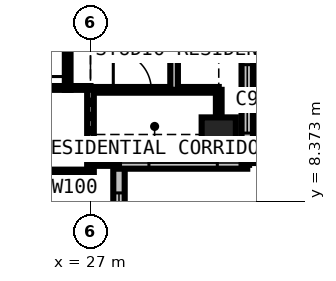
"""IFC4 building model, lengths in metres.
Left out: names, types, materials, properties, quantities, classifications, styles, units other than length and angle.
Written with IfcOpenShell. Run it as: python <this file> out.ifc"""

import sys

from ifc_helpers import new_model, si_unit, direction, frame, frame_2d, origin, origin_2d, place, context, subcontext, project, spatial, rectangle, extrude, element, fill, save


model = new_model("IFC4")
c1 = context("Model", 3, precision=1e-05, world=origin(), true_north=direction((0.0, 1.0)))
c2 = subcontext(c1, "Body", "Model", "MODEL_VIEW")
j1 = project(units=[si_unit("LENGTHUNIT", "METRE"), si_unit("PLANEANGLEUNIT", "RADIAN")], contexts=[c1])
p1 = place(None, origin())
s1 = spatial("IfcSite", under=j1, at=p1, CompositionType="ELEMENT")
p2 = place(p1, origin())
s2 = spatial("IfcBuilding", under=s1, at=p2, CompositionType="ELEMENT")
p3 = place(p2, frame((0.0, 0.0, 211.5)))
s3 = spatial("IfcBuildingStorey", under=s2, at=p3, CompositionType="ELEMENT", Elevation=211.5)
p4 = place(p3, frame((30.375, 10.125, 0.0), z_axis=(0.0, 0.0, 1.0), x_axis=(1.0, 0.0, 0.0)))
e1 = element("IfcColumn", 1, at=p4, inside=s3, PredefinedType="COLUMN", context=c2, shape_type="SweptSolid", body=[
    extrude(rectangle(XDim=0.9, YDim=0.9, at=origin_2d()), origin(), (0.0, 0.0, 1.0), 3.6),
])
p5 = place(p3, frame((27.75, 6.0, 0.0), z_axis=(0.0, 0.0, 1.0), x_axis=(0.0, 1.0, 0.0)))
e2 = element("IfcWall", 2, at=p5, inside=s3, PredefinedType="SOLIDWALL", context=c2, shape_type="SweptSolid", body=[
    extrude(rectangle(XDim=3.375, YDim=0.3, at=frame_2d((1.688, 0.0))), origin(), (0.0, 0.0, 1.0), 3.375),
])
p6 = place(p5, frame((0.788, 0.0, 0.6)))
e3 = element("IfcOpeningElement", 3, at=p6, cuts=e2, PredefinedType="OPENING", context=c2, shape_type="SweptSolid", body=[
    extrude(rectangle(XDim=1.8, YDim=2.1, at=frame_2d((0.9, 1.05))), frame((0.0, 0.16, 0.0), z_axis=(0.0, -1.0, 0.0), x_axis=(1.0, 0.0, 0.0)), (0.0, 0.0, 1.0), 0.32),
])
p7 = place(p3, frame((27.75, 9.375, 0.0), z_axis=(0.0, 0.0, 1.0), x_axis=(1.0, 0.0, 0.0)))
e4 = element("IfcWall", 4, at=p7, inside=s3, PredefinedType="SOLIDWALL", context=c2, shape_type="SweptSolid", body=[
    extrude(rectangle(XDim=3.375, YDim=0.3, at=frame_2d((1.688, 0.0))), origin(), (0.0, 0.0, 1.0), 3.375),
])
p8 = place(p7, frame((0.788, 0.0, 0.6)))
e5 = element("IfcOpeningElement", 5, at=p8, cuts=e4, PredefinedType="OPENING", context=c2, shape_type="SweptSolid", body=[
    extrude(rectangle(XDim=1.8, YDim=2.1, at=frame_2d((0.9, 1.05))), frame((0.0, 0.16, 0.0), z_axis=(0.0, -1.0, 0.0), x_axis=(1.0, 0.0, 0.0)), (0.0, 0.0, 1.0), 0.32),
])
p9 = place(p3, frame((31.125, 9.375, 0.0), z_axis=(0.0, 0.0, 1.0), x_axis=(0.0, 1.0, 0.0)))
e6 = element("IfcWall", 6, at=p9, inside=s3, PredefinedType="SOLIDWALL", context=c2, shape_type="SweptSolid", body=[
    extrude(rectangle(XDim=3.375, YDim=0.3, at=frame_2d((1.688, 0.0))), origin(), (0.0, 0.0, 1.0), 3.375),
])
p10 = place(p9, frame((0.788, 0.0, 0.6)))
e7 = element("IfcOpeningElement", 7, at=p10, cuts=e6, PredefinedType="OPENING", context=c2, shape_type="SweptSolid", body=[
    extrude(rectangle(XDim=1.8, YDim=2.1, at=frame_2d((0.9, 1.05))), frame((0.0, 0.16, 0.0), z_axis=(0.0, -1.0, 0.0), x_axis=(1.0, 0.0, 0.0)), (0.0, 0.0, 1.0), 0.32),
])
p11 = place(p3, frame((23.625, 11.35, 0.0), z_axis=(0.0, 0.0, 1.0), x_axis=(1.0, 0.0, 0.0)))
e8 = element("IfcWall", 8, at=p11, inside=s3, PredefinedType="PARTITIONING", context=c2, shape_type="SweptSolid", body=[
    extrude(rectangle(XDim=3.375, YDim=0.1, at=frame_2d((1.688, 0.0))), origin(), (0.0, 0.0, 1.0), 3.375),
])
p12 = place(p11, frame((0.25, 0.0, 0.0)))
e9 = element("IfcOpeningElement", 9, at=p12, cuts=e8, PredefinedType="OPENING", context=c2, shape_type="SweptSolid", body=[
    extrude(rectangle(XDim=0.95, YDim=2.2, at=frame_2d((0.475, 1.1))), frame((0.0, 0.06, 0.0), z_axis=(0.0, -1.0, 0.0), x_axis=(1.0, 0.0, 0.0)), (0.0, 0.0, 1.0), 0.12),
])
p13 = place(p3, frame((25.0, 9.15, 0.0), z_axis=(0.0, 0.0, 1.0), x_axis=(1.0, 0.0, 0.0)))
e10 = element("IfcWall", 10, at=p13, inside=s3, PredefinedType="PARTITIONING", context=c2, shape_type="SweptSolid", body=[
    extrude(rectangle(XDim=2.0, YDim=0.1, at=frame_2d((1.0, 0.0))), origin(), (0.0, 0.0, 1.0), 3.375),
])
p14 = place(p3, frame((26.4, 11.3, 0.0), z_axis=(0.0, 0.0, 1.0), x_axis=(0.0, 1.0, 0.0)))
e11 = element("IfcWall", 11, at=p14, inside=s3, PredefinedType="PARTITIONING", context=c2, shape_type="SweptSolid", body=[
    extrude(rectangle(XDim=1.6, YDim=0.15, at=frame_2d((0.8, 0.0))), origin(), (0.0, 0.0, 1.0), 3.375),
])
p15 = place(p14, frame((0.35, 0.0, 0.0)))
e12 = element("IfcOpeningElement", 12, at=p15, cuts=e11, PredefinedType="OPENING", context=c2, shape_type="SweptSolid", body=[
    extrude(rectangle(XDim=1.0, YDim=2.2, at=frame_2d((0.5, 1.1))), frame((0.0, 0.085, 0.0), z_axis=(0.0, -1.0, 0.0), x_axis=(1.0, 0.0, 0.0)), (0.0, 0.0, 1.0), 0.17),
])
p16 = place(p3, frame((27.0, 11.3, 0.0), z_axis=(0.0, 0.0, 1.0), x_axis=(1.0, 0.0, 0.0)))
e13 = element("IfcWall", 13, at=p16, inside=s3, PredefinedType="PARTITIONING", context=c2, shape_type="SweptSolid", body=[
    extrude(rectangle(XDim=3.375, YDim=0.15, at=frame_2d((1.688, 0.0))), origin(), (0.0, 0.0, 1.0), 3.375),
])
p17 = place(p16, frame((0.6, 0.0, 0.0)))
e14 = element("IfcOpeningElement", 14, at=p17, cuts=e13, PredefinedType="OPENING", context=c2, shape_type="SweptSolid", body=[
    extrude(rectangle(XDim=1.0, YDim=2.2, at=frame_2d((0.5, 1.1))), frame((0.0, 0.085, 0.0), z_axis=(0.0, -1.0, 0.0), x_axis=(1.0, 0.0, 0.0)), (0.0, 0.0, 1.0), 0.17),
])
p18 = place(p3, frame((27.0, 6.016, 0.0), z_axis=(0.0, 0.0, 1.0), x_axis=(0.0, 1.0, 0.0)))
e15 = element("IfcWall", 15, at=p18, inside=s3, PredefinedType="PARTITIONING", context=c2, shape_type="SweptSolid", body=[
    extrude(rectangle(XDim=5.334, YDim=0.175, at=frame_2d((2.667, 0.0))), origin(), (0.0, 0.0, 1.0), 2.877),
])
p19 = place(p3, frame((27.0, 9.375, 0.0), z_axis=(0.0, 0.0, 1.0), x_axis=(1.0, 0.0, 0.0)))
e16 = element("IfcWall", 16, at=p19, inside=s3, PredefinedType="PARTITIONING", context=c2, shape_type="SweptSolid", body=[
    extrude(rectangle(XDim=0.734, YDim=0.15, at=frame_2d((0.367, 0.0))), origin(), (0.0, 0.0, 1.0), 3.375),
])
p20 = place(p3, frame((29.2, 11.3, 0.0), z_axis=(0.0, 0.0, 1.0), x_axis=(0.0, 1.0, 0.0)))
e17 = element("IfcWall", 17, at=p20, inside=s3, PredefinedType="PARTITIONING", context=c2, shape_type="SweptSolid", body=[
    extrude(rectangle(XDim=17.9, YDim=0.2, at=frame_2d((8.95, 0.0))), origin(), (0.0, 0.0, 1.0), 3.375),
])
p21 = place(p20, frame((2.3, 0.0, 0.0)))
e18 = element("IfcOpeningElement", 18, at=p21, cuts=e17, PredefinedType="OPENING", context=c2, shape_type="SweptSolid", body=[
    extrude(rectangle(XDim=1.0, YDim=2.2, at=frame_2d((0.5, 1.1))), frame((0.0, 0.11, 0.0), z_axis=(0.0, -1.0, 0.0), x_axis=(1.0, 0.0, 0.0)), (0.0, 0.0, 1.0), 0.22),
])
p22 = place(p20, frame((5.775, 0.0, 0.0)))
e19 = element("IfcOpeningElement", 19, at=p22, cuts=e17, PredefinedType="OPENING", context=c2, shape_type="SweptSolid", body=[
    extrude(rectangle(XDim=0.95, YDim=2.2, at=frame_2d((0.475, 1.1))), frame((0.0, 0.11, 0.0), z_axis=(0.0, -1.0, 0.0), x_axis=(1.0, 0.0, 0.0)), (0.0, 0.0, 1.0), 0.22),
])
p23 = place(p20, frame((9.2, 0.0, 0.0)))
e20 = element("IfcOpeningElement", 20, at=p23, cuts=e17, PredefinedType="OPENING", context=c2, shape_type="SweptSolid", body=[
    extrude(rectangle(XDim=0.95, YDim=2.2, at=frame_2d((0.475, 1.1))), frame((0.0, 0.11, 0.0), z_axis=(0.0, -1.0, 0.0), x_axis=(1.0, 0.0, 0.0)), (0.0, 0.0, 1.0), 0.22),
])
p24 = place(p20, frame((12.575, 0.0, 0.0)))
e21 = element("IfcOpeningElement", 21, at=p24, cuts=e17, PredefinedType="OPENING", context=c2, shape_type="SweptSolid", body=[
    extrude(rectangle(XDim=0.95, YDim=2.2, at=frame_2d((0.475, 1.1))), frame((0.0, 0.11, 0.0), z_axis=(0.0, -1.0, 0.0), x_axis=(1.0, 0.0, 0.0)), (0.0, 0.0, 1.0), 0.22),
])
p25 = place(p20, frame((16.3, 0.0, 0.0)))
e22 = element("IfcOpeningElement", 22, at=p25, cuts=e17, PredefinedType="OPENING", context=c2, shape_type="SweptSolid", body=[
    extrude(rectangle(XDim=1.0, YDim=2.2, at=frame_2d((0.5, 1.1))), frame((0.0, 0.11, 0.0), z_axis=(0.0, -1.0, 0.0), x_axis=(1.0, 0.0, 0.0)), (0.0, 0.0, 1.0), 0.22),
])
p26 = place(p3, frame((30.375, 9.525, 0.0), z_axis=(0.0, 0.0, 1.0), x_axis=(0.0, 1.0, 0.0)))
e23 = element("IfcWall", 23, at=p26, inside=s3, PredefinedType="PARTITIONING", context=c2, shape_type="SweptSolid", body=[
    extrude(rectangle(XDim=1.775, YDim=0.15, at=frame_2d((0.888, 0.0))), origin(), (0.0, 0.0, 1.0), 2.877),
])
p27 = place(p6, origin())
e24 = element("IfcWindow", 24, at=p27, inside=s3, PartitioningType="SINGLE_PANEL", PredefinedType="WINDOW", context=c2, shape_type="SweptSolid", body=[
    extrude(rectangle(XDim=1.8, YDim=2.1, at=frame_2d((0.9, 1.05))), frame((0.0, 0.03, 0.0), z_axis=(0.0, -1.0, 0.0), x_axis=(1.0, 0.0, 0.0)), (0.0, 0.0, 1.0), 0.06),
])
fill(e3, e24)
p28 = place(p8, origin())
e25 = element("IfcWindow", 25, at=p28, inside=s3, PartitioningType="SINGLE_PANEL", PredefinedType="WINDOW", context=c2, shape_type="SweptSolid", body=[
    extrude(rectangle(XDim=1.8, YDim=2.1, at=frame_2d((0.9, 1.05))), frame((0.0, 0.03, 0.0), z_axis=(0.0, -1.0, 0.0), x_axis=(1.0, 0.0, 0.0)), (0.0, 0.0, 1.0), 0.06),
])
fill(e5, e25)
p29 = place(p10, origin())
e26 = element("IfcWindow", 26, at=p29, inside=s3, PartitioningType="SINGLE_PANEL", PredefinedType="WINDOW", context=c2, shape_type="SweptSolid", body=[
    extrude(rectangle(XDim=1.8, YDim=2.1, at=frame_2d((0.9, 1.05))), frame((0.0, 0.03, 0.0), z_axis=(0.0, -1.0, 0.0), x_axis=(1.0, 0.0, 0.0)), (0.0, 0.0, 1.0), 0.06),
])
fill(e7, e26)
p30 = place(p17, origin())
e27 = element("IfcDoor", 27, at=p30, inside=s3, OperationType="SINGLE_SWING_LEFT", PredefinedType="DOOR", context=c2, shape_type="SweptSolid", body=[
    extrude(rectangle(XDim=1.0, YDim=2.2, at=frame_2d((0.5, 1.1))), frame((0.0, 0.025, 0.0), z_axis=(0.0, -1.0, 0.0), x_axis=(1.0, 0.0, 0.0)), (0.0, 0.0, 1.0), 0.05),
])
fill(e14, e27)
p31 = place(p15, origin())
e28 = element("IfcDoor", 28, at=p31, inside=s3, OperationType="SINGLE_SWING_LEFT", PredefinedType="DOOR", context=c2, shape_type="SweptSolid", body=[
    extrude(rectangle(XDim=1.0, YDim=2.2, at=frame_2d((0.5, 1.1))), frame((0.0, 0.025, 0.0), z_axis=(0.0, -1.0, 0.0), x_axis=(1.0, 0.0, 0.0)), (0.0, 0.0, 1.0), 0.05),
])
fill(e12, e28)
save(model, sys.argv[1])
